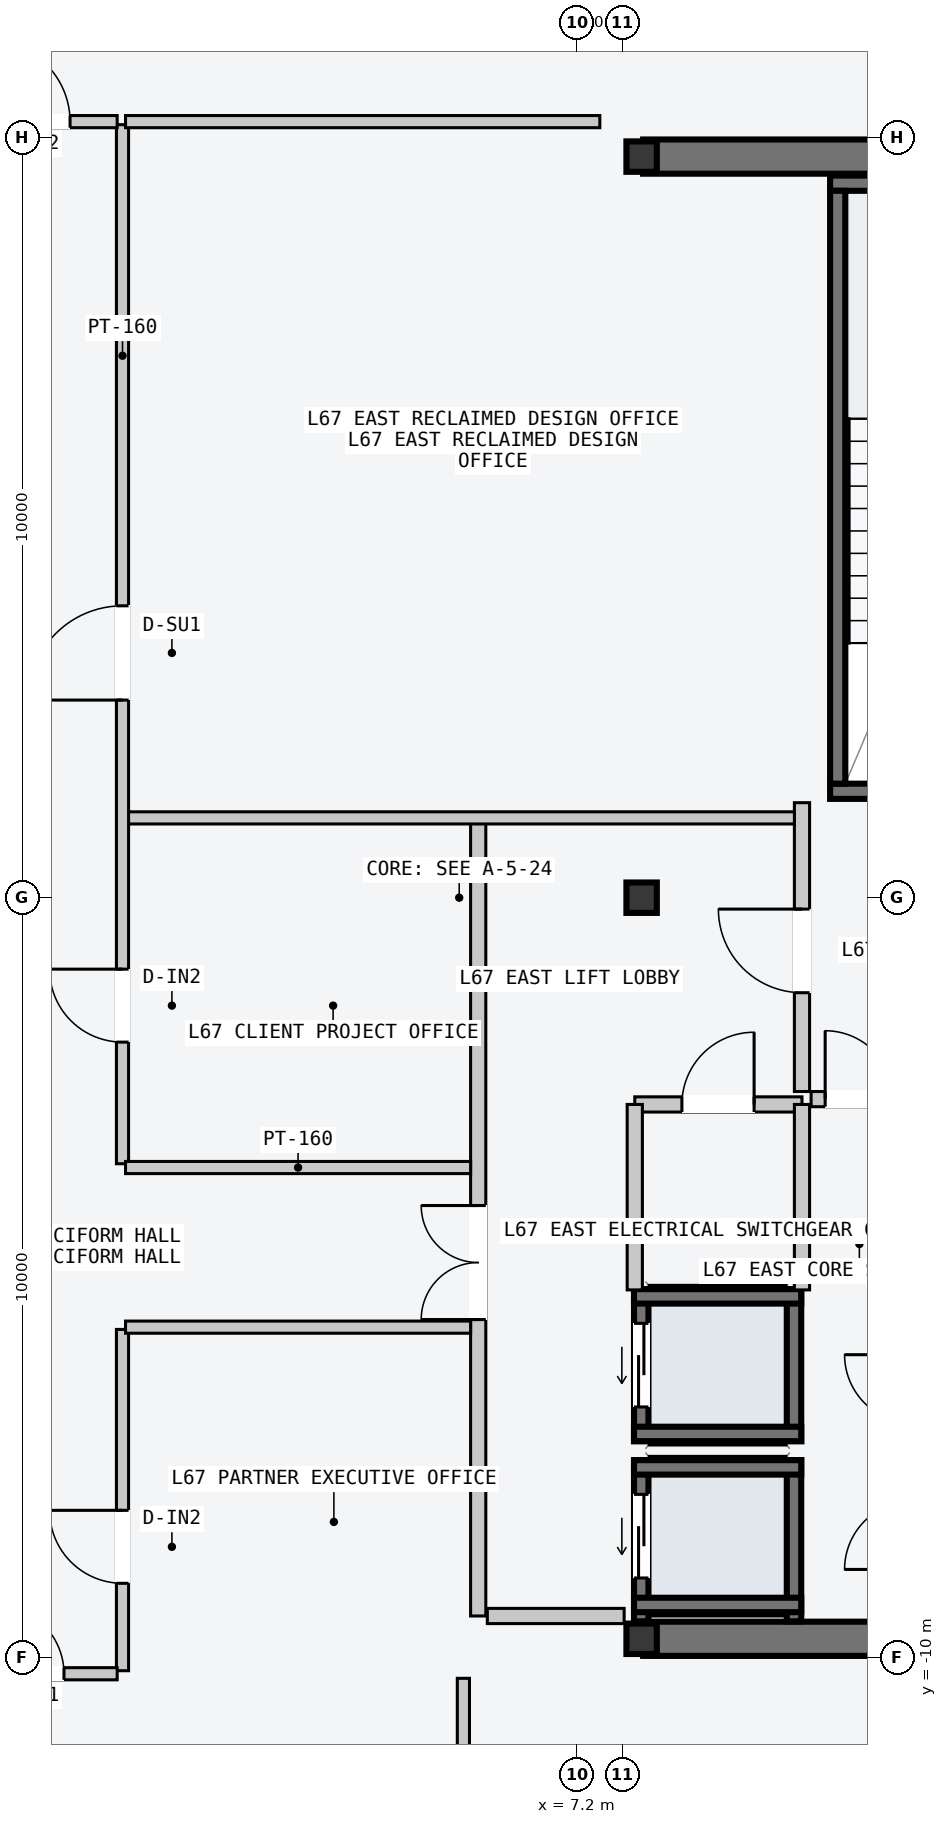
"""IFC4 building model, lengths in metres.
Left out: names, types, materials, properties, quantities, classifications, styles, units other than length and angle.
Written with IfcOpenShell. Run it as: python <this file> out.ifc"""

import sys

from ifc_helpers import new_model, si_unit, direction, frame, frame_2d, origin, origin_2d, place, context, subcontext, project, spatial, rectangle, i_section, extrude, element, fill, save


model = new_model("IFC4")
c1 = context("Model", 3, precision=1e-05, world=origin(), true_north=direction((0.0, 1.0)))
c2 = subcontext(c1, "Body", "Model", "MODEL_VIEW")
j1 = project(units=[si_unit("LENGTHUNIT", "METRE"), si_unit("PLANEANGLEUNIT", "RADIAN")], contexts=[c1])
p1 = place(None, origin())
s1 = spatial("IfcSite", under=j1, at=p1, CompositionType="ELEMENT")
p2 = place(p1, origin())
s2 = spatial("IfcBuilding", under=s1, at=p2, CompositionType="ELEMENT")
p3 = place(p2, frame((0.0, 0.0, 254.4)))
s3 = spatial("IfcBuildingStorey", under=s2, at=p3, CompositionType="ELEMENT", Elevation=254.4)
for number, where, z_axis, x_axis in (
    (1, (8.07, -9.75, -0.2), (0.0, 0.0, 1.0), (1.0, 0.0, 0.0)),
    (2, (8.07, 9.75, -0.2), (0.0, 0.0, 1.0), (1.0, 0.0, 0.0)),
):
    element("IfcWall", number, at=place(p3, frame(where, z_axis=z_axis, x_axis=x_axis)), inside=s3, PredefinedType="SHEAR", context=c2, shape_type="SweptSolid", body=[
        extrude(rectangle(XDim=6.46, YDim=0.45, at=frame_2d((3.23, 0.0))), origin(), (0.0, 0.0, 1.0), 3.6),
    ])
p4 = place(p3, frame((10.53, 1.4, -0.2), z_axis=(0.0, 0.0, 1.0), x_axis=(1.0, 0.0, 0.0)))
e3 = element("IfcWall", 3, at=p4, inside=s3, PredefinedType="SOLIDWALL", context=c2, shape_type="SweptSolid", body=[
    extrude(rectangle(XDim=3.72, YDim=0.2, at=frame_2d((1.86, 0.0))), origin(), (0.0, 0.0, 1.0), 3.6),
])
p5 = place(p4, frame((1.5, 0.0, 0.2)))
e4 = element("IfcOpeningElement", 4, at=p5, cuts=e3, PredefinedType="OPENING", context=c2, shape_type="SweptSolid", body=[
    extrude(rectangle(XDim=1.12, YDim=2.18, at=frame_2d((0.56, 1.09))), frame((0.0, 0.11, 0.0), z_axis=(0.0, -1.0, 0.0), x_axis=(1.0, 0.0, 0.0)), (0.0, 0.0, 1.0), 0.22),
])
p6 = place(p3, frame((10.53, 9.4, -0.2), z_axis=(0.0, 0.0, 1.0), x_axis=(1.0, 0.0, 0.0)))
e5 = element("IfcWall", 5, at=p6, inside=s3, PredefinedType="SOLIDWALL", context=c2, shape_type="SweptSolid", body=[
    extrude(rectangle(XDim=3.72, YDim=0.2, at=frame_2d((1.86, 0.0))), origin(), (0.0, 0.0, 1.0), 3.6),
])
p7 = place(p3, frame((10.63, 1.5, -0.2), z_axis=(0.0, 0.0, 1.0), x_axis=(0.0, 1.0, 0.0)))
e6 = element("IfcWall", 6, at=p7, inside=s3, PredefinedType="SOLIDWALL", context=c2, shape_type="SweptSolid", body=[
    extrude(rectangle(XDim=7.8, YDim=0.2, at=frame_2d((3.9, 0.0))), origin(), (0.0, 0.0, 1.0), 3.6),
])
for number, where, z_axis, x_axis in (
    (7, (8.05, -9.75, 0.0), (0.0, 0.0, 1.0), (1.0, 0.0, 0.0)),
    (8, (8.05, 0.0, 0.0), (0.0, 0.0, 1.0), (1.0, 0.0, 0.0)),
    (9, (8.05, 9.75, 0.0), (0.0, 0.0, 1.0), (1.0, 0.0, 0.0)),
):
    element("IfcColumn", number, at=place(p3, frame(where, z_axis=z_axis, x_axis=x_axis)), inside=s3, PredefinedType="COLUMN", context=c2, shape_type="SweptSolid", body=[
        extrude(i_section(OverallWidth=0.4, OverallDepth=0.4, WebThickness=0.013, FlangeThickness=0.021, at=origin_2d()), origin(), (0.0, 0.0, 1.0), 3.6),
    ])
p8 = place(p3, frame((8.045, -9.52, -0.2), z_axis=(0.0, 0.0, 1.0), x_axis=(0.0, 1.0, 0.0)))
e10 = element("IfcWall", 10, at=p8, inside=s3, PredefinedType="SOLIDWALL", context=c2, shape_type="SweptSolid", body=[
    extrude(rectangle(XDim=2.12, YDim=0.19, at=frame_2d((1.06, 0.0))), origin(), (0.0, 0.0, 1.0), 3.6),
])
p9 = place(p8, frame((0.57, 0.0, 0.2)))
e11 = element("IfcOpeningElement", 11, at=p9, cuts=e10, PredefinedType="OPENING", context=c2, shape_type="SweptSolid", body=[
    extrude(rectangle(XDim=1.1, YDim=2.2, at=frame_2d((0.55, 1.1))), frame((0.0, 0.105, 0.0), z_axis=(0.0, -1.0, 0.0), x_axis=(1.0, 0.0, 0.0)), (0.0, 0.0, 1.0), 0.21),
])
p10 = place(p3, frame((10.055, -9.52, -0.2), z_axis=(0.0, 0.0, 1.0), x_axis=(0.0, 1.0, 0.0)))
e12 = element("IfcWall", 12, at=p10, inside=s3, PredefinedType="SOLIDWALL", context=c2, shape_type="SweptSolid", body=[
    extrude(rectangle(XDim=2.12, YDim=0.19, at=frame_2d((1.06, 0.0))), origin(), (0.0, 0.0, 1.0), 3.6),
])
for number, where, z_axis, x_axis in (
    (13, (7.95, -7.495, -0.2), (0.0, 0.0, 1.0), (1.0, 0.0, 0.0)),
    (14, (7.95, -9.305, -0.2), (0.0, 0.0, 1.0), (1.0, 0.0, 0.0)),
):
    element("IfcWall", number, at=place(p3, frame(where, z_axis=z_axis, x_axis=x_axis)), inside=s3, PredefinedType="SOLIDWALL", context=c2, shape_type="SweptSolid", body=[
        extrude(rectangle(XDim=2.2, YDim=0.19, at=frame_2d((1.1, 0.0))), origin(), (0.0, 0.0, 1.0), 3.6),
    ])
p11 = place(p3, frame((8.045, -7.15, -0.2), z_axis=(0.0, 0.0, 1.0), x_axis=(0.0, 1.0, 0.0)))
e15 = element("IfcWall", 15, at=p11, inside=s3, PredefinedType="SOLIDWALL", context=c2, shape_type="SweptSolid", body=[
    extrude(rectangle(XDim=2.0, YDim=0.19, at=frame_2d((1.0, 0.0))), origin(), (0.0, 0.0, 1.0), 3.6),
])
p12 = place(p11, frame((0.45, 0.0, 0.2)))
e16 = element("IfcOpeningElement", 16, at=p12, cuts=e15, PredefinedType="OPENING", context=c2, shape_type="SweptSolid", body=[
    extrude(rectangle(XDim=1.1, YDim=2.2, at=frame_2d((0.55, 1.1))), frame((0.0, 0.105, 0.0), z_axis=(0.0, -1.0, 0.0), x_axis=(1.0, 0.0, 0.0)), (0.0, 0.0, 1.0), 0.21),
])
p13 = place(p3, frame((10.055, -7.15, -0.2), z_axis=(0.0, 0.0, 1.0), x_axis=(0.0, 1.0, 0.0)))
e17 = element("IfcWall", 17, at=p13, inside=s3, PredefinedType="SOLIDWALL", context=c2, shape_type="SweptSolid", body=[
    extrude(rectangle(XDim=2.0, YDim=0.19, at=frame_2d((1.0, 0.0))), origin(), (0.0, 0.0, 1.0), 3.6),
])
for number, where, z_axis, x_axis in (
    (18, (7.95, -5.245, -0.2), (0.0, 0.0, 1.0), (1.0, 0.0, 0.0)),
    (19, (7.95, -7.055, -0.2), (0.0, 0.0, 1.0), (1.0, 0.0, 0.0)),
):
    element("IfcWall", number, at=place(p3, frame(where, z_axis=z_axis, x_axis=x_axis)), inside=s3, PredefinedType="SOLIDWALL", context=c2, shape_type="SweptSolid", body=[
        extrude(rectangle(XDim=2.2, YDim=0.19, at=frame_2d((1.1, 0.0))), origin(), (0.0, 0.0, 1.0), 3.6),
    ])
p14 = place(p3, frame((5.9, -9.45, 0.0), z_axis=(0.0, 0.0, 1.0), x_axis=(0.0, 1.0, 0.0)))
e20 = element("IfcWall", 20, at=p14, inside=s3, PredefinedType="PARTITIONING", context=c2, shape_type="SweptSolid", body=[
    extrude(rectangle(XDim=10.5, YDim=0.2, at=frame_2d((5.25, 0.0))), origin(), (0.0, 0.0, 1.0), 3.4),
])
p15 = place(p14, frame((3.9, 0.0, 0.0)))
e21 = element("IfcOpeningElement", 21, at=p15, cuts=e20, PredefinedType="OPENING", context=c2, shape_type="SweptSolid", body=[
    extrude(rectangle(XDim=1.5, YDim=2.2, at=frame_2d((0.75, 1.1))), frame((0.0, 0.11, 0.0), z_axis=(0.0, -1.0, 0.0), x_axis=(1.0, 0.0, 0.0)), (0.0, 0.0, 1.0), 0.22),
])
p16 = place(p3, frame((6.02, -9.45, 0.0), z_axis=(0.0, 0.0, 1.0), x_axis=(1.0, 0.0, 0.0)))
e22 = element("IfcWall", 22, at=p16, inside=s3, PredefinedType="PARTITIONING", context=c2, shape_type="SweptSolid", body=[
    extrude(rectangle(XDim=1.8, YDim=0.2, at=frame_2d((0.9, 0.0))), origin(), (0.0, 0.0, 1.0), 3.4),
])
p17 = place(p3, frame((10.16, -2.55, 0.0), z_axis=(0.0, 0.0, 1.0), x_axis=(0.0, 1.0, 0.0)))
e23 = element("IfcWall", 23, at=p17, inside=s3, PredefinedType="PARTITIONING", context=c2, shape_type="SweptSolid", body=[
    extrude(rectangle(XDim=3.8, YDim=0.2, at=frame_2d((1.9, 0.0))), origin(), (0.0, 0.0, 1.0), 3.4),
])
p18 = place(p17, frame((1.3, 0.0, 0.0)))
e24 = element("IfcOpeningElement", 24, at=p18, cuts=e23, PredefinedType="OPENING", context=c2, shape_type="SweptSolid", body=[
    extrude(rectangle(XDim=1.1, YDim=2.15, at=frame_2d((0.55, 1.075))), frame((0.0, 0.11, 0.0), z_axis=(0.0, -1.0, 0.0), x_axis=(1.0, 0.0, 0.0)), (0.0, 0.0, 1.0), 0.22),
])
p19 = place(p3, frame((10.28, -2.65, 0.0), z_axis=(0.0, 0.0, 1.0), x_axis=(1.0, 0.0, 0.0)))
e25 = element("IfcWall", 25, at=p19, inside=s3, PredefinedType="PARTITIONING", context=c2, shape_type="SweptSolid", body=[
    extrude(rectangle(XDim=1.27, YDim=0.2, at=frame_2d((0.635, 0.0))), origin(), (0.0, 0.0, 1.0), 3.4),
])
p20 = place(p19, frame((0.185, 0.0, 0.0)))
e26 = element("IfcOpeningElement", 26, at=p20, cuts=e25, PredefinedType="OPENING", context=c2, shape_type="SweptSolid", body=[
    extrude(rectangle(XDim=0.9, YDim=2.15, at=frame_2d((0.45, 1.075))), frame((0.0, 0.11, 0.0), z_axis=(0.0, -1.0, 0.0), x_axis=(1.0, 0.0, 0.0)), (0.0, 0.0, 1.0), 0.22),
])
p21 = place(p3, frame((7.96, -2.72, 0.0), z_axis=(0.0, 0.0, 1.0), x_axis=(1.0, 0.0, 0.0)))
e27 = element("IfcWall", 27, at=p21, inside=s3, PredefinedType="PARTITIONING", context=c2, shape_type="SweptSolid", body=[
    extrude(rectangle(XDim=2.2, YDim=0.2, at=frame_2d((1.1, 0.0))), origin(), (0.0, 0.0, 1.0), 3.4),
])
p22 = place(p21, frame((0.62, 0.0, 0.0)))
e28 = element("IfcOpeningElement", 28, at=p22, cuts=e27, PredefinedType="OPENING", context=c2, shape_type="SweptSolid", body=[
    extrude(rectangle(XDim=0.95, YDim=2.1, at=frame_2d((0.475, 1.05))), frame((0.0, 0.11, 0.0), z_axis=(0.0, -1.0, 0.0), x_axis=(1.0, 0.0, 0.0)), (0.0, 0.0, 1.0), 0.22),
])
for number, where, z_axis, x_axis in (
    (29, (7.96, -5.16, 0.0), (0.0, 0.0, 1.0), (0.0, 1.0, 0.0)),
    (30, (10.16, -5.16, 0.0), (0.0, 0.0, 1.0), (0.0, 1.0, 0.0)),
):
    element("IfcWall", number, at=place(p3, frame(where, z_axis=z_axis, x_axis=x_axis)), inside=s3, PredefinedType="PARTITIONING", context=c2, shape_type="SweptSolid", body=[
        extrude(rectangle(XDim=2.44, YDim=0.2, at=frame_2d((1.22, 0.0))), origin(), (0.0, 0.0, 1.0), 3.4),
    ])
p23 = place(p3, frame((1.26, 1.05, 0.0), z_axis=(0.0, 0.0, 1.0), x_axis=(1.0, 0.0, 0.0)))
e31 = element("IfcWall", 31, at=p23, inside=s3, PredefinedType="PARTITIONING", context=c2, shape_type="SweptSolid", body=[
    extrude(rectangle(XDim=8.8, YDim=0.16, at=frame_2d((4.4, 0.0))), origin(), (0.0, 0.0, 1.0), 3.4),
])
p24 = place(p3, frame((1.22, -3.5, 0.0), z_axis=(0.0, 0.0, 1.0), x_axis=(0.0, 1.0, 0.0)))
e32 = element("IfcWall", 32, at=p24, inside=s3, PredefinedType="PARTITIONING", context=c2, shape_type="SweptSolid", body=[
    extrude(rectangle(XDim=13.67, YDim=0.16, at=frame_2d((6.835, 0.0))), origin(), (0.0, 0.0, 1.0), 3.4),
])
p25 = place(p24, frame((6.1, 0.0, 0.0)))
e33 = element("IfcOpeningElement", 33, at=p25, cuts=e32, PredefinedType="OPENING", context=c2, shape_type="SweptSolid", body=[
    extrude(rectangle(XDim=1.24, YDim=2.24, at=frame_2d((0.62, 1.12))), frame((0.0, 0.09, 0.0), z_axis=(0.0, -1.0, 0.0), x_axis=(1.0, 0.0, 0.0)), (0.0, 0.0, 1.0), 0.18),
])
p26 = place(p24, frame((1.6, 0.0, 0.0)))
e34 = element("IfcOpeningElement", 34, at=p26, cuts=e32, PredefinedType="OPENING", context=c2, shape_type="SweptSolid", body=[
    extrude(rectangle(XDim=0.96, YDim=2.18, at=frame_2d((0.48, 1.09))), frame((0.0, 0.09, 0.0), z_axis=(0.0, -1.0, 0.0), x_axis=(1.0, 0.0, 0.0)), (0.0, 0.0, 1.0), 0.18),
])
p27 = place(p3, frame((1.26, 10.21, 0.0), z_axis=(0.0, 0.0, 1.0), x_axis=(1.0, 0.0, 0.0)))
e35 = element("IfcWall", 35, at=p27, inside=s3, PredefinedType="PARTITIONING", context=c2, shape_type="SweptSolid", body=[
    extrude(rectangle(XDim=6.24, YDim=0.16, at=frame_2d((3.12, 0.0))), origin(), (0.0, 0.0, 1.0), 3.4),
])
p28 = place(p3, frame((1.26, -3.55, 0.0), z_axis=(0.0, 0.0, 1.0), x_axis=(1.0, 0.0, 0.0)))
e36 = element("IfcWall", 36, at=p28, inside=s3, PredefinedType="PARTITIONING", context=c2, shape_type="SweptSolid", body=[
    extrude(rectangle(XDim=4.54, YDim=0.16, at=frame_2d((2.27, 0.0))), origin(), (0.0, 0.0, 1.0), 3.4),
])
p29 = place(p3, frame((1.22, -10.17, 0.0), z_axis=(0.0, 0.0, 1.0), x_axis=(0.0, 1.0, 0.0)))
e37 = element("IfcWall", 37, at=p29, inside=s3, PredefinedType="PARTITIONING", context=c2, shape_type="SweptSolid", body=[
    extrude(rectangle(XDim=4.49, YDim=0.16, at=frame_2d((2.245, 0.0))), origin(), (0.0, 0.0, 1.0), 3.4),
])
p30 = place(p29, frame((1.15, 0.0, 0.0)))
e38 = element("IfcOpeningElement", 38, at=p30, cuts=e37, PredefinedType="OPENING", context=c2, shape_type="SweptSolid", body=[
    extrude(rectangle(XDim=0.96, YDim=2.18, at=frame_2d((0.48, 1.09))), frame((0.0, 0.09, 0.0), z_axis=(0.0, -1.0, 0.0), x_axis=(1.0, 0.0, 0.0)), (0.0, 0.0, 1.0), 0.18),
])
p31 = place(p3, frame((1.26, -5.65, 0.0), z_axis=(0.0, 0.0, 1.0), x_axis=(1.0, 0.0, 0.0)))
e39 = element("IfcWall", 39, at=p31, inside=s3, PredefinedType="PARTITIONING", context=c2, shape_type="SweptSolid", body=[
    extrude(rectangle(XDim=4.54, YDim=0.16, at=frame_2d((2.27, 0.0))), origin(), (0.0, 0.0, 1.0), 3.4),
])
p32 = place(p3, frame((-1.15, 10.21, 0.0), z_axis=(0.0, 0.0, 1.0), x_axis=(1.0, 0.0, 0.0)))
e40 = element("IfcWall", 40, at=p32, inside=s3, PredefinedType="PARTITIONING", context=c2, shape_type="SweptSolid", body=[
    extrude(rectangle(XDim=2.3, YDim=0.16, at=frame_2d((1.15, 0.0))), origin(), (0.0, 0.0, 1.0), 3.4),
])
p33 = place(p32, frame((0.62, 0.0, 0.0)))
e41 = element("IfcOpeningElement", 41, at=p33, cuts=e40, PredefinedType="OPENING", context=c2, shape_type="SweptSolid", body=[
    extrude(rectangle(XDim=1.06, YDim=2.2, at=frame_2d((0.53, 1.1))), frame((0.0, 0.09, 0.0), z_axis=(0.0, -1.0, 0.0), x_axis=(1.0, 0.0, 0.0)), (0.0, 0.0, 1.0), 0.18),
])
p34 = place(p3, frame((5.705, -17.56, 0.0), z_axis=(0.0, 0.0, 1.0), x_axis=(0.0, 1.0, 0.0)))
e42 = element("IfcWall", 42, at=p34, inside=s3, PredefinedType="PARTITIONING", context=c2, shape_type="SweptSolid", body=[
    extrude(rectangle(XDim=7.29, YDim=0.16, at=frame_2d((3.645, 0.0))), origin(), (0.0, 0.0, 1.0), 3.4),
])
p35 = place(p34, frame((1.05, 0.0, 0.0)))
e43 = element("IfcOpeningElement", 43, at=p35, cuts=e42, PredefinedType="OPENING", context=c2, shape_type="SweptSolid", body=[
    extrude(rectangle(XDim=0.96, YDim=2.18, at=frame_2d((0.48, 1.09))), frame((0.0, 0.09, 0.0), z_axis=(0.0, -1.0, 0.0), x_axis=(1.0, 0.0, 0.0)), (0.0, 0.0, 1.0), 0.18),
])
p36 = place(p3, frame((-1.15, -10.21, 0.0), z_axis=(0.0, 0.0, 1.0), x_axis=(1.0, 0.0, 0.0)))
e44 = element("IfcWall", 44, at=p36, inside=s3, PredefinedType="PARTITIONING", context=c2, shape_type="SweptSolid", body=[
    extrude(rectangle(XDim=2.3, YDim=0.16, at=frame_2d((1.15, 0.0))), origin(), (0.0, 0.0, 1.0), 3.4),
])
p37 = place(p36, frame((0.7, 0.0, 0.0)))
e45 = element("IfcOpeningElement", 45, at=p37, cuts=e44, PredefinedType="OPENING", context=c2, shape_type="SweptSolid", body=[
    extrude(rectangle(XDim=0.9, YDim=2.15, at=frame_2d((0.45, 1.075))), frame((0.0, 0.09, 0.0), z_axis=(0.0, -1.0, 0.0), x_axis=(1.0, 0.0, 0.0)), (0.0, 0.0, 1.0), 0.18),
])
p38 = place(p9, origin())
e46 = element("IfcDoor", 46, at=p38, inside=s3, OperationType="SLIDING_TO_LEFT", PredefinedType="DOOR", context=c2, shape_type="SweptSolid", body=[
    extrude(rectangle(XDim=1.1, YDim=2.2, at=frame_2d((0.55, 1.1))), frame((0.0, 0.025, 0.0), z_axis=(0.0, -1.0, 0.0), x_axis=(1.0, 0.0, 0.0)), (0.0, 0.0, 1.0), 0.05),
])
fill(e11, e46)
p39 = place(p12, origin())
e47 = element("IfcDoor", 47, at=p39, inside=s3, OperationType="SLIDING_TO_LEFT", PredefinedType="DOOR", context=c2, shape_type="SweptSolid", body=[
    extrude(rectangle(XDim=1.1, YDim=2.2, at=frame_2d((0.55, 1.1))), frame((0.0, 0.025, 0.0), z_axis=(0.0, -1.0, 0.0), x_axis=(1.0, 0.0, 0.0)), (0.0, 0.0, 1.0), 0.05),
])
fill(e16, e47)
p40 = place(p15, origin())
e48 = element("IfcDoor", 48, at=p40, inside=s3, OperationType="DOUBLE_DOOR_SINGLE_SWING", PredefinedType="DOOR", context=c2, shape_type="SweptSolid", body=[
    extrude(rectangle(XDim=1.5, YDim=2.2, at=frame_2d((0.75, 1.1))), frame((0.0, 0.025, 0.0), z_axis=(0.0, -1.0, 0.0), x_axis=(1.0, 0.0, 0.0)), (0.0, 0.0, 1.0), 0.05),
])
fill(e21, e48)
p41 = place(p18, origin())
e49 = element("IfcDoor", 49, at=p41, inside=s3, OperationType="SINGLE_SWING_RIGHT", PredefinedType="DOOR", context=c2, shape_type="SweptSolid", body=[
    extrude(rectangle(XDim=1.1, YDim=2.15, at=frame_2d((0.55, 1.075))), frame((0.0, 0.025, 0.0), z_axis=(0.0, -1.0, 0.0), x_axis=(1.0, 0.0, 0.0)), (0.0, 0.0, 1.0), 0.05),
])
fill(e24, e49)
p42 = place(p20, origin())
e50 = element("IfcDoor", 50, at=p42, inside=s3, OperationType="SINGLE_SWING_LEFT", PredefinedType="DOOR", context=c2, shape_type="SweptSolid", body=[
    extrude(rectangle(XDim=0.9, YDim=2.15, at=frame_2d((0.45, 1.075))), frame((0.0, 0.025, 0.0), z_axis=(0.0, -1.0, 0.0), x_axis=(1.0, 0.0, 0.0)), (0.0, 0.0, 1.0), 0.05),
])
fill(e26, e50)
p43 = place(p22, origin())
e51 = element("IfcDoor", 51, at=p43, inside=s3, OperationType="SINGLE_SWING_RIGHT", PredefinedType="DOOR", context=c2, shape_type="SweptSolid", body=[
    extrude(rectangle(XDim=0.95, YDim=2.1, at=frame_2d((0.475, 1.05))), frame((0.0, 0.025, 0.0), z_axis=(0.0, -1.0, 0.0), x_axis=(1.0, 0.0, 0.0)), (0.0, 0.0, 1.0), 0.05),
])
fill(e28, e51)
p44 = place(p25, origin())
e52 = element("IfcDoor", 52, at=p44, inside=s3, OperationType="SINGLE_SWING_LEFT", PredefinedType="DOOR", context=c2, shape_type="SweptSolid", body=[
    extrude(rectangle(XDim=1.24, YDim=2.24, at=frame_2d((0.62, 1.12))), frame((0.0, 0.025, 0.0), z_axis=(0.0, -1.0, 0.0), x_axis=(1.0, 0.0, 0.0)), (0.0, 0.0, 1.0), 0.05),
])
fill(e33, e52)
p45 = place(p26, origin())
e53 = element("IfcDoor", 53, at=p45, inside=s3, OperationType="SINGLE_SWING_RIGHT", PredefinedType="DOOR", context=c2, shape_type="SweptSolid", body=[
    extrude(rectangle(XDim=0.96, YDim=2.18, at=frame_2d((0.48, 1.09))), frame((0.0, 0.025, 0.0), z_axis=(0.0, -1.0, 0.0), x_axis=(1.0, 0.0, 0.0)), (0.0, 0.0, 1.0), 0.05),
])
fill(e34, e53)
p46 = place(p30, origin())
e54 = element("IfcDoor", 54, at=p46, inside=s3, OperationType="SINGLE_SWING_RIGHT", PredefinedType="DOOR", context=c2, shape_type="SweptSolid", body=[
    extrude(rectangle(XDim=0.96, YDim=2.18, at=frame_2d((0.48, 1.09))), frame((0.0, 0.025, 0.0), z_axis=(0.0, -1.0, 0.0), x_axis=(1.0, 0.0, 0.0)), (0.0, 0.0, 1.0), 0.05),
])
fill(e38, e54)
p47 = place(p33, origin())
e55 = element("IfcDoor", 55, at=p47, inside=s3, OperationType="SINGLE_SWING_LEFT", PredefinedType="DOOR", context=c2, shape_type="SweptSolid", body=[
    extrude(rectangle(XDim=1.06, YDim=2.2, at=frame_2d((0.53, 1.1))), frame((0.0, 0.025, 0.0), z_axis=(0.0, -1.0, 0.0), x_axis=(1.0, 0.0, 0.0)), (0.0, 0.0, 1.0), 0.05),
])
fill(e41, e55)
p48 = place(p37, origin())
e56 = element("IfcDoor", 56, at=p48, inside=s3, OperationType="SINGLE_SWING_LEFT", PredefinedType="DOOR", context=c2, shape_type="SweptSolid", body=[
    extrude(rectangle(XDim=0.9, YDim=2.15, at=frame_2d((0.45, 1.075))), frame((0.0, 0.025, 0.0), z_axis=(0.0, -1.0, 0.0), x_axis=(1.0, 0.0, 0.0)), (0.0, 0.0, 1.0), 0.05),
])
fill(e45, e56)
save(model, sys.argv[1])
